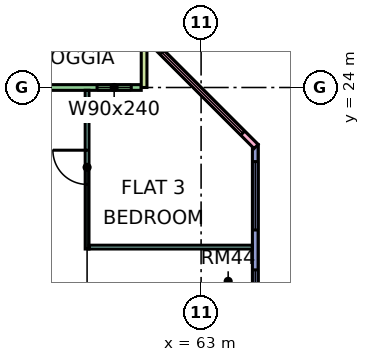
"""IFC4 building model, lengths in metres.
Left out: names, types, materials, properties, quantities, classifications, styles, units other than length and angle.
Written with IfcOpenShell. Run it as: python <this file> out.ifc"""

import sys

from ifc_helpers import new_model, si_unit, direction, frame, frame_2d, origin, place, context, subcontext, project, spatial, rectangle, extrude, element, fill, save


model = new_model("IFC4")
c1 = context("Model", 3, precision=1e-05, world=origin(), true_north=direction((0.0, 1.0)))
c2 = subcontext(c1, "Body", "Model", "MODEL_VIEW")
j1 = project(units=[si_unit("LENGTHUNIT", "METRE"), si_unit("PLANEANGLEUNIT", "RADIAN")], contexts=[c1])
p1 = place(None, origin())
s1 = spatial("IfcSite", under=j1, at=p1, CompositionType="ELEMENT")
p2 = place(p1, origin())
s2 = spatial("IfcBuilding", under=s1, at=p2, CompositionType="ELEMENT")
p3 = place(p2, frame((0.0, 0.0, 157.4)))
s3 = spatial("IfcBuildingStorey", under=s2, at=p3, CompositionType="ELEMENT", Elevation=157.4)
p4 = place(p3, frame((61.425, 24.0, 0.0), z_axis=(0.0, 0.0, 1.0), x_axis=(-1.0, 0.0, 0.0)))
e1 = element("IfcWall", 1, at=p4, inside=s3, PredefinedType="SOLIDWALL", context=c2, shape_type="SweptSolid", body=[
    extrude(rectangle(XDim=13.35, YDim=0.15, at=frame_2d((6.675, 0.0))), origin(), (0.0, 0.0, 1.0), 3.35),
])
p5 = place(p4, frame((0.262, 0.0, 0.45)))
e2 = element("IfcOpeningElement", 2, at=p5, cuts=e1, PredefinedType="OPENING", context=c2, shape_type="SweptSolid", body=[
    extrude(rectangle(XDim=0.9, YDim=2.4, at=frame_2d((0.45, 1.2))), frame((0.0, 0.085, 0.0), z_axis=(0.0, -1.0, 0.0), x_axis=(1.0, 0.0, 0.0)), (0.0, 0.0, 1.0), 0.17),
])
p6 = place(p4, frame((3.25, 0.0, 0.0)))
e3 = element("IfcOpeningElement", 3, at=p6, cuts=e1, PredefinedType="OPENING", context=c2, shape_type="SweptSolid", body=[
    extrude(rectangle(XDim=1.8, YDim=2.4, at=frame_2d((0.9, 1.2))), frame((0.0, 0.085, 0.0), z_axis=(0.0, -1.0, 0.0), x_axis=(1.0, 0.0, 0.0)), (0.0, 0.0, 1.0), 0.17),
])
p7 = place(p4, frame((8.562, 0.0, 0.45)))
e4 = element("IfcOpeningElement", 4, at=p7, cuts=e1, PredefinedType="OPENING", context=c2, shape_type="SweptSolid", body=[
    extrude(rectangle(XDim=4.2, YDim=2.4, at=frame_2d((2.1, 1.2))), frame((0.0, 0.085, 0.0), z_axis=(0.0, -1.0, 0.0), x_axis=(1.0, 0.0, 0.0)), (0.0, 0.0, 1.0), 0.17),
])
p8 = place(p3, frame((61.5, 25.5, 0.0), z_axis=(0.0, 0.0, 1.0), x_axis=(0.0, -1.0, 0.0)))
e5 = element("IfcWall", 5, at=p8, inside=s3, PredefinedType="SOLIDWALL", context=c2, shape_type="SweptSolid", body=[
    extrude(rectangle(XDim=1.5, YDim=0.15, at=frame_2d((0.75, 0.0))), origin(), (0.0, 0.0, 1.0), 3.35),
])
p9 = place(p3, frame((64.425, 12.075, 0.0), z_axis=(0.0, 0.0, 1.0), x_axis=(0.0, 1.0, 0.0)))
e6 = element("IfcWall", 6, at=p9, inside=s3, PredefinedType="SOLIDWALL", context=c2, shape_type="SweptSolid", body=[
    extrude(rectangle(XDim=10.425, YDim=0.15, at=frame_2d((5.212, 0.0))), origin(), (0.0, 0.0, 1.0), 3.35),
])
p10 = place(p9, frame((4.125, 0.0, 0.45)))
e7 = element("IfcOpeningElement", 7, at=p10, cuts=e6, PredefinedType="OPENING", context=c2, shape_type="SweptSolid", body=[
    extrude(rectangle(XDim=3.0, YDim=2.4, at=frame_2d((1.5, 1.2))), frame((0.0, 0.085, 0.0), z_axis=(0.0, -1.0, 0.0), x_axis=(1.0, 0.0, 0.0)), (0.0, 0.0, 1.0), 0.17),
])
p11 = place(p9, frame((8.175, 0.0, 0.45)))
e8 = element("IfcOpeningElement", 8, at=p11, cuts=e6, PredefinedType="OPENING", context=c2, shape_type="SweptSolid", body=[
    extrude(rectangle(XDim=1.8, YDim=2.4, at=frame_2d((0.9, 1.2))), frame((0.0, 0.085, 0.0), z_axis=(0.0, -1.0, 0.0), x_axis=(1.0, 0.0, 0.0)), (0.0, 0.0, 1.0), 0.17),
])
p12 = place(p3, frame((64.447, 22.447, 0.0), z_axis=(0.0, 0.0, 1.0), x_axis=(-0.707106781187, 0.707106781187, 0.0)))
e9 = element("IfcWall", 9, at=p12, inside=s3, PredefinedType="SOLIDWALL", context=c2, shape_type="SweptSolid", body=[
    extrude(rectangle(XDim=4.243, YDim=0.15, at=frame_2d((2.121, 0.0))), origin(), (0.0, 0.0, 1.0), 3.35),
])
p13 = place(p12, frame((0.498, 0.0, 0.45)))
e10 = element("IfcOpeningElement", 10, at=p13, cuts=e9, PredefinedType="OPENING", context=c2, shape_type="SweptSolid", body=[
    extrude(rectangle(XDim=3.0, YDim=2.4, at=frame_2d((1.5, 1.2))), frame((0.0, 0.085, 0.0), z_axis=(0.0, -1.0, 0.0), x_axis=(1.0, 0.0, 0.0)), (0.0, 0.0, 1.0), 0.17),
])
p14 = place(p3, frame((60.0, 19.75, 0.0), z_axis=(0.0, 0.0, 1.0), x_axis=(0.0, 1.0, 0.0)))
e11 = element("IfcWall", 11, at=p14, inside=s3, PredefinedType="PARTITIONING", context=c2, shape_type="SweptSolid", body=[
    extrude(rectangle(XDim=4.176, YDim=0.1, at=frame_2d((2.088, 0.0))), origin(), (0.0, 0.0, 1.0), 3.35),
])
p15 = place(p14, frame((1.7, 0.0, 0.0)))
e12 = element("IfcOpeningElement", 12, at=p15, cuts=e11, PredefinedType="OPENING", context=c2, shape_type="SweptSolid", body=[
    extrude(rectangle(XDim=0.9, YDim=2.1, at=frame_2d((0.45, 1.05))), frame((0.0, 0.06, 0.0), z_axis=(0.0, -1.0, 0.0), x_axis=(1.0, 0.0, 0.0)), (0.0, 0.0, 1.0), 0.12),
])
p16 = place(p3, frame((60.05, 19.8, 0.0), z_axis=(0.0, 0.0, 1.0), x_axis=(1.0, 0.0, 0.0)))
e13 = element("IfcWall", 13, at=p16, inside=s3, PredefinedType="PARTITIONING", context=c2, shape_type="SweptSolid", body=[
    extrude(rectangle(XDim=4.3, YDim=0.1, at=frame_2d((2.15, 0.0))), origin(), (0.0, 0.0, 1.0), 3.35),
])
p17 = place(p5, origin())
e14 = element("IfcWindow", 14, at=p17, inside=s3, PartitioningType="SINGLE_PANEL", PredefinedType="WINDOW", context=c2, shape_type="SweptSolid", body=[
    extrude(rectangle(XDim=0.9, YDim=2.4, at=frame_2d((0.45, 1.2))), frame((0.0, 0.03, 0.0), z_axis=(0.0, -1.0, 0.0), x_axis=(1.0, 0.0, 0.0)), (0.0, 0.0, 1.0), 0.06),
])
fill(e2, e14)
p18 = place(p10, origin())
e15 = element("IfcWindow", 15, at=p18, inside=s3, PartitioningType="SINGLE_PANEL", PredefinedType="WINDOW", context=c2, shape_type="SweptSolid", body=[
    extrude(rectangle(XDim=3.0, YDim=2.4, at=frame_2d((1.5, 1.2))), frame((0.0, 0.03, 0.0), z_axis=(0.0, -1.0, 0.0), x_axis=(1.0, 0.0, 0.0)), (0.0, 0.0, 1.0), 0.06),
])
fill(e7, e15)
p19 = place(p11, origin())
e16 = element("IfcWindow", 16, at=p19, inside=s3, PartitioningType="SINGLE_PANEL", PredefinedType="WINDOW", context=c2, shape_type="SweptSolid", body=[
    extrude(rectangle(XDim=1.8, YDim=2.4, at=frame_2d((0.9, 1.2))), frame((0.0, 0.03, 0.0), z_axis=(0.0, -1.0, 0.0), x_axis=(1.0, 0.0, 0.0)), (0.0, 0.0, 1.0), 0.06),
])
fill(e8, e16)
p20 = place(p13, origin())
e17 = element("IfcWindow", 17, at=p20, inside=s3, PartitioningType="SINGLE_PANEL", PredefinedType="WINDOW", context=c2, shape_type="SweptSolid", body=[
    extrude(rectangle(XDim=3.0, YDim=2.4, at=frame_2d((1.5, 1.2))), frame((0.0, 0.03, 0.0), z_axis=(0.0, -1.0, 0.0), x_axis=(1.0, 0.0, 0.0)), (0.0, 0.0, 1.0), 0.06),
])
fill(e10, e17)
p21 = place(p15, frame((0.9, 0.0, 0.0), z_axis=(0.0, 0.0, 1.0), x_axis=(-1.0, 0.0, 0.0)))
e18 = element("IfcDoor", 18, at=p21, inside=s3, OperationType="SINGLE_SWING_RIGHT", PredefinedType="DOOR", context=c2, shape_type="SweptSolid", body=[
    extrude(rectangle(XDim=0.9, YDim=2.1, at=frame_2d((0.45, 1.05))), frame((0.0, 0.025, 0.0), z_axis=(0.0, -1.0, 0.0), x_axis=(1.0, 0.0, 0.0)), (0.0, 0.0, 1.0), 0.05),
])
fill(e12, e18)
save(model, sys.argv[1])
